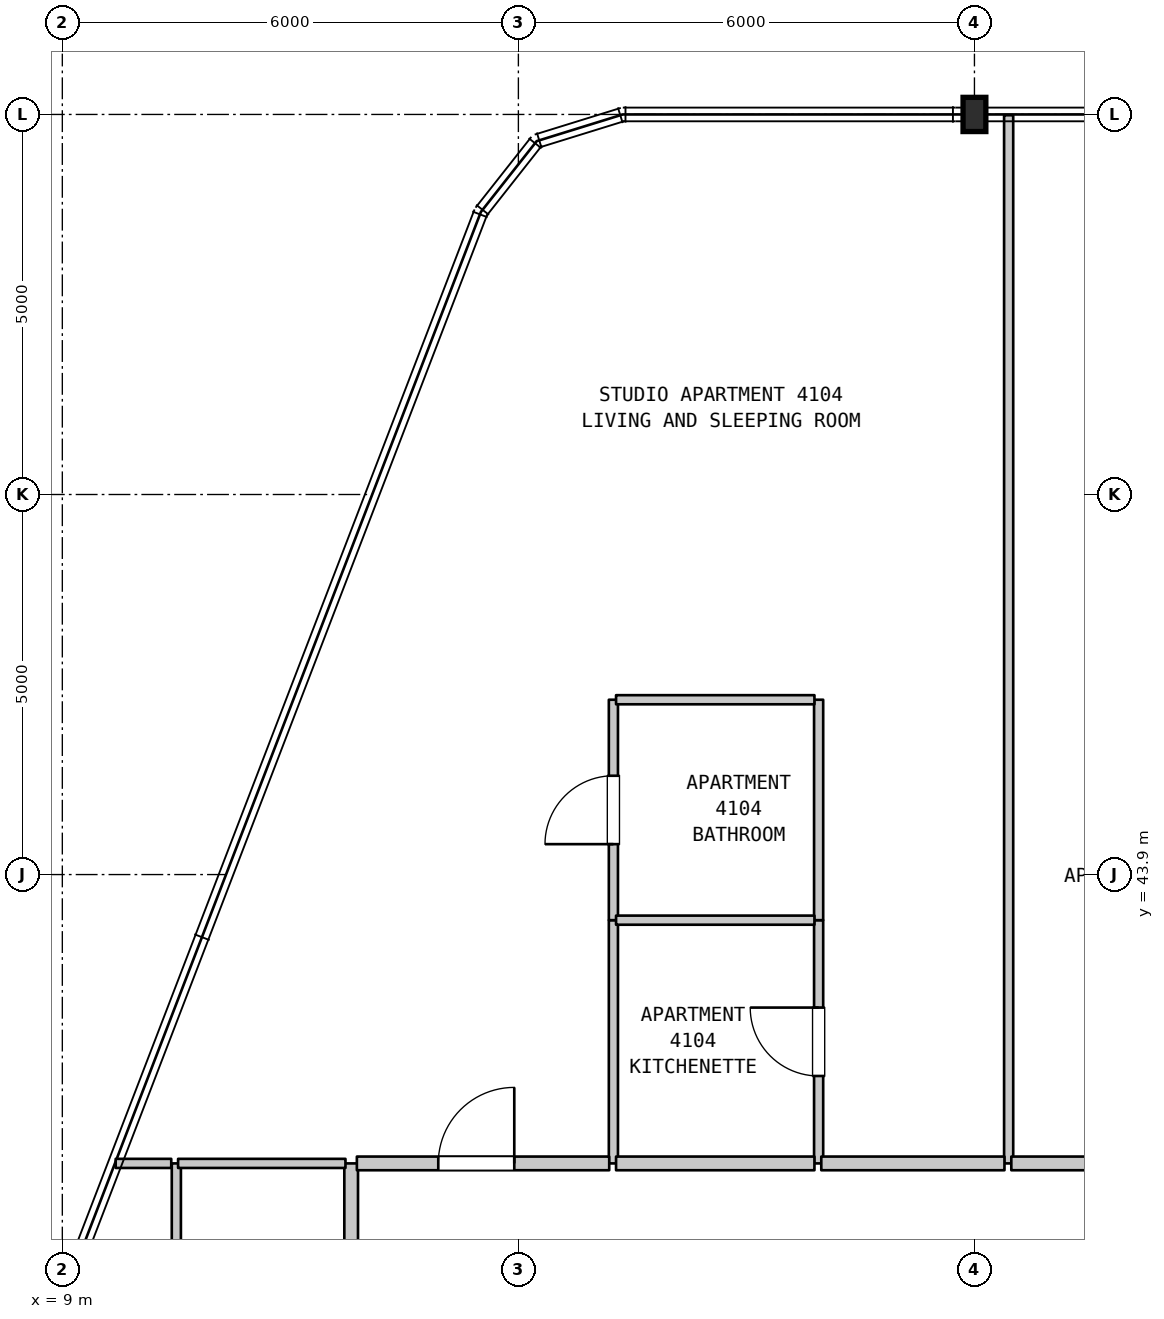
"""IFC4 building model, lengths in metres.
Left out: names, types, materials, properties, quantities, classifications, styles, units other than length and angle.
Written with IfcOpenShell. Run it as: python <this file> out.ifc"""

import sys

from ifc_helpers import new_model, si_unit, direction, frame, frame_2d, origin, origin_2d, place, context, subcontext, project, spatial, rectangle, i_section, extrude, element, fill, save


model = new_model("IFC4")
c1 = context("Model", 3, precision=1e-05, world=origin(), true_north=direction((0.0, 1.0)))
c2 = subcontext(c1, "Body", "Model", "MODEL_VIEW")
j1 = project(units=[si_unit("LENGTHUNIT", "METRE"), si_unit("PLANEANGLEUNIT", "RADIAN")], contexts=[c1])
p1 = place(None, origin())
s1 = spatial("IfcSite", under=j1, at=p1, CompositionType="ELEMENT")
p2 = place(p1, origin())
s2 = spatial("IfcBuilding", under=s1, at=p2, CompositionType="ELEMENT")
p3 = place(p2, frame((0.0, 0.0, 169.1)))
s3 = spatial("IfcBuildingStorey", under=s2, at=p3, CompositionType="ELEMENT", Elevation=169.1)
p4 = place(p3, frame((21.0, 53.9, 0.0), z_axis=(0.0, 0.0, 1.0), x_axis=(1.0, 0.0, 0.0)))
e1 = element("IfcColumn", 1, at=p4, inside=s3, PredefinedType="COLUMN", context=c2, shape_type="SweptSolid", body=[
    extrude(i_section(OverallWidth=0.3, OverallDepth=0.45, WebThickness=0.014, FlangeThickness=0.026, FilletRadius=0.027, at=origin_2d()), origin(), (0.0, 0.0, 1.0), 3.7),
])
p5 = place(p3, frame((10.5, 31.45, 0.0), z_axis=(0.0, 0.0, 1.0), x_axis=(0.0, 1.0, 0.0)))
e2 = element("IfcWall", 2, at=p5, inside=s3, PredefinedType="PARTITIONING", context=c2, shape_type="SweptSolid", body=[
    extrude(rectangle(XDim=8.65, YDim=0.12, at=frame_2d((4.325, 0.0))), origin(), (0.0, 0.0, 1.0), 3.39),
])
p6 = place(p3, frame((12.8, 31.45, 0.0), z_axis=(0.0, 0.0, 1.0), x_axis=(0.0, 1.0, 0.0)))
e3 = element("IfcWall", 3, at=p6, inside=s3, PredefinedType="STANDARD", context=c2, shape_type="SweptSolid", body=[
    extrude(rectangle(XDim=8.65, YDim=0.18, at=frame_2d((4.325, 0.0))), origin(), (0.0, 0.0, 1.0), 3.39),
])
p7 = place(p3, frame((16.25, 40.1, 0.0), z_axis=(0.0, 0.0, 1.0), x_axis=(0.0, 1.0, 0.0)))
e4 = element("IfcWall", 4, at=p7, inside=s3, PredefinedType="PARTITIONING", context=c2, shape_type="SweptSolid", body=[
    extrude(rectangle(XDim=3.2, YDim=0.12, at=frame_2d((1.6, 0.0))), origin(), (0.0, 0.0, 1.0), 3.39),
])
p8 = place(p3, frame((16.25, 43.3, 0.0), z_axis=(0.0, 0.0, 1.0), x_axis=(0.0, 1.0, 0.0)))
e5 = element("IfcWall", 5, at=p8, inside=s3, PredefinedType="PARTITIONING", context=c2, shape_type="SweptSolid", body=[
    extrude(rectangle(XDim=2.9, YDim=0.12, at=frame_2d((1.45, 0.0))), origin(), (0.0, 0.0, 1.0), 3.39),
])
p9 = place(p8, frame((1.0, 0.0, 0.0)))
e6 = element("IfcOpeningElement", 6, at=p9, cuts=e5, PredefinedType="OPENING", context=c2, shape_type="SweptSolid", body=[
    extrude(rectangle(XDim=0.9, YDim=2.1, at=frame_2d((0.45, 1.05))), frame((0.0, 0.07, 0.0), z_axis=(0.0, -1.0, 0.0), x_axis=(1.0, 0.0, 0.0)), (0.0, 0.0, 1.0), 0.14),
])
p10 = place(p3, frame((18.95, 40.1, 0.0), z_axis=(0.0, 0.0, 1.0), x_axis=(0.0, 1.0, 0.0)))
e7 = element("IfcWall", 7, at=p10, inside=s3, PredefinedType="PARTITIONING", context=c2, shape_type="SweptSolid", body=[
    extrude(rectangle(XDim=3.2, YDim=0.12, at=frame_2d((1.6, 0.0))), origin(), (0.0, 0.0, 1.0), 3.39),
])
p11 = place(p10, frame((1.15, 0.0, 0.0)))
e8 = element("IfcOpeningElement", 8, at=p11, cuts=e7, PredefinedType="OPENING", context=c2, shape_type="SweptSolid", body=[
    extrude(rectangle(XDim=0.9, YDim=2.15, at=frame_2d((0.45, 1.075))), frame((0.0, 0.07, 0.0), z_axis=(0.0, -1.0, 0.0), x_axis=(1.0, 0.0, 0.0)), (0.0, 0.0, 1.0), 0.14),
])
p12 = place(p3, frame((18.95, 43.3, 0.0), z_axis=(0.0, 0.0, 1.0), x_axis=(0.0, 1.0, 0.0)))
e9 = element("IfcWall", 9, at=p12, inside=s3, PredefinedType="PARTITIONING", context=c2, shape_type="SweptSolid", body=[
    extrude(rectangle(XDim=2.9, YDim=0.12, at=frame_2d((1.45, 0.0))), origin(), (0.0, 0.0, 1.0), 3.39),
])
p13 = place(p3, frame((21.45, 40.1, 0.0), z_axis=(0.0, 0.0, 1.0), x_axis=(0.0, 1.0, 0.0)))
e10 = element("IfcWall", 10, at=p13, inside=s3, PredefinedType="PARTITIONING", context=c2, shape_type="SweptSolid", body=[
    extrude(rectangle(XDim=13.79, YDim=0.12, at=frame_2d((6.895, 0.0))), origin(), (0.0, 0.0, 1.0), 3.39),
])
p14 = place(p3, frame((9.702, 40.1, 0.0), z_axis=(0.0, 0.0, 1.0), x_axis=(1.0, 0.0, 0.0)))
e11 = element("IfcWall", 11, at=p14, inside=s3, PredefinedType="PARTITIONING", context=c2, shape_type="SweptSolid", body=[
    extrude(rectangle(XDim=0.731, YDim=0.12, at=frame_2d((0.366, 0.0))), origin(), (0.0, 0.0, 1.0), 3.39),
])
p15 = place(p3, frame((10.523, 40.1, 0.0), z_axis=(0.0, 0.0, 1.0), x_axis=(1.0, 0.0, 0.0)))
e12 = element("IfcWall", 12, at=p15, inside=s3, PredefinedType="PARTITIONING", context=c2, shape_type="SweptSolid", body=[
    extrude(rectangle(XDim=2.202, YDim=0.12, at=frame_2d((1.101, 0.0))), origin(), (0.0, 0.0, 1.0), 3.39),
])
p16 = place(p3, frame((12.875, 40.1, 0.0), z_axis=(0.0, 0.0, 1.0), x_axis=(1.0, 0.0, 0.0)))
e13 = element("IfcWall", 13, at=p16, inside=s3, PredefinedType="STANDARD", context=c2, shape_type="SweptSolid", body=[
    extrude(rectangle(XDim=3.32, YDim=0.18, at=frame_2d((1.66, 0.0))), origin(), (0.0, 0.0, 1.0), 3.39),
])
p17 = place(p16, frame((1.071, 0.0, 0.0)))
e14 = element("IfcOpeningElement", 14, at=p17, cuts=e13, PredefinedType="OPENING", context=c2, shape_type="SweptSolid", body=[
    extrude(rectangle(XDim=1.0, YDim=2.15, at=frame_2d((0.5, 1.075))), frame((0.0, 0.1, 0.0), z_axis=(0.0, -1.0, 0.0), x_axis=(1.0, 0.0, 0.0)), (0.0, 0.0, 1.0), 0.2),
])
p18 = place(p3, frame((16.285, 40.1, 0.0), z_axis=(0.0, 0.0, 1.0), x_axis=(1.0, 0.0, 0.0)))
e15 = element("IfcWall", 15, at=p18, inside=s3, PredefinedType="STANDARD", context=c2, shape_type="SweptSolid", body=[
    extrude(rectangle(XDim=2.61, YDim=0.18, at=frame_2d((1.305, 0.0))), origin(), (0.0, 0.0, 1.0), 3.39),
])
p19 = place(p3, frame((18.985, 40.1, 0.0), z_axis=(0.0, 0.0, 1.0), x_axis=(1.0, 0.0, 0.0)))
e16 = element("IfcWall", 16, at=p19, inside=s3, PredefinedType="STANDARD", context=c2, shape_type="SweptSolid", body=[
    extrude(rectangle(XDim=2.41, YDim=0.18, at=frame_2d((1.205, 0.0))), origin(), (0.0, 0.0, 1.0), 3.39),
])
p20 = place(p3, frame((21.485, 40.1, 0.0), z_axis=(0.0, 0.0, 1.0), x_axis=(1.0, 0.0, 0.0)))
e17 = element("IfcWall", 17, at=p20, inside=s3, PredefinedType="STANDARD", context=c2, shape_type="SweptSolid", body=[
    extrude(rectangle(XDim=4.19, YDim=0.18, at=frame_2d((2.095, 0.0))), origin(), (0.0, 0.0, 1.0), 3.39),
])
p21 = place(p20, frame((1.522, 0.0, 0.0)))
e18 = element("IfcOpeningElement", 18, at=p21, cuts=e17, PredefinedType="OPENING", context=c2, shape_type="SweptSolid", body=[
    extrude(rectangle(XDim=1.0, YDim=2.15, at=frame_2d((0.5, 1.075))), frame((0.0, 0.1, 0.0), z_axis=(0.0, -1.0, 0.0), x_axis=(1.0, 0.0, 0.0)), (0.0, 0.0, 1.0), 0.2),
])
for number, where, z_axis, x_axis in (
    (19, (16.285, 43.3, 0.0), (0.0, 0.0, 1.0), (1.0, 0.0, 0.0)),
    (20, (16.285, 46.2, 0.0), (0.0, 0.0, 1.0), (1.0, 0.0, 0.0)),
):
    element("IfcWall", number, at=place(p3, frame(where, z_axis=z_axis, x_axis=x_axis)), inside=s3, PredefinedType="PARTITIONING", context=c2, shape_type="SweptSolid", body=[
        extrude(rectangle(XDim=2.61, YDim=0.12, at=frame_2d((1.305, 0.0))), origin(), (0.0, 0.0, 1.0), 3.39),
    ])
p22 = place(p9, origin())
e21 = element("IfcDoor", 21, at=p22, inside=s3, OperationType="SINGLE_SWING_LEFT", PredefinedType="DOOR", context=c2, shape_type="SweptSolid", body=[
    extrude(rectangle(XDim=0.9, YDim=2.1, at=frame_2d((0.45, 1.05))), frame((0.0, 0.025, 0.0), z_axis=(0.0, -1.0, 0.0), x_axis=(1.0, 0.0, 0.0)), (0.0, 0.0, 1.0), 0.05),
])
fill(e6, e21)
p23 = place(p11, origin())
e22 = element("IfcDoor", 22, at=p23, inside=s3, OperationType="SINGLE_SWING_RIGHT", PredefinedType="DOOR", context=c2, shape_type="SweptSolid", body=[
    extrude(rectangle(XDim=0.9, YDim=2.15, at=frame_2d((0.45, 1.075))), frame((0.0, 0.025, 0.0), z_axis=(0.0, -1.0, 0.0), x_axis=(1.0, 0.0, 0.0)), (0.0, 0.0, 1.0), 0.05),
])
fill(e8, e22)
p24 = place(p17, origin())
e23 = element("IfcDoor", 23, at=p24, inside=s3, OperationType="SINGLE_SWING_RIGHT", PredefinedType="DOOR", context=c2, shape_type="SweptSolid", body=[
    extrude(rectangle(XDim=1.0, YDim=2.15, at=frame_2d((0.5, 1.075))), frame((0.0, 0.025, 0.0), z_axis=(0.0, -1.0, 0.0), x_axis=(1.0, 0.0, 0.0)), (0.0, 0.0, 1.0), 0.05),
])
fill(e14, e23)
save(model, sys.argv[1])
